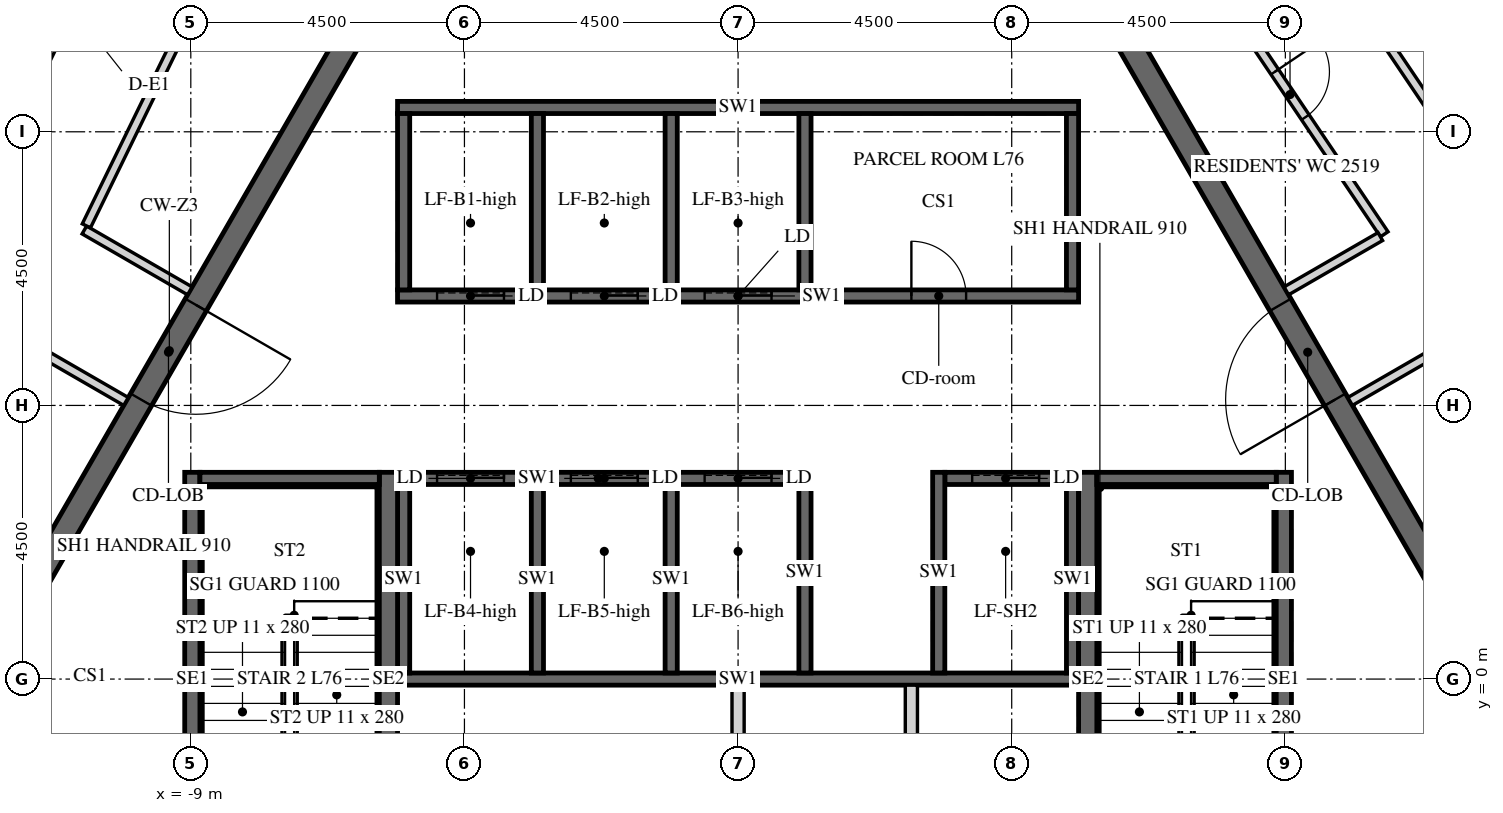
"""IFC4 building model, lengths in metres.
Left out: names, types, materials, properties, quantities, classifications, styles, units other than length and angle.
Written with IfcOpenShell. Run it as: python <this file> out.ifc"""

import sys

from ifc_helpers import new_model, si_unit, direction, frame, frame_2d, origin, place, context, subcontext, project, spatial, polyline, rectangle, outline, extrude, element, fill, save


model = new_model("IFC4")
c1 = context("Model", 3, precision=1e-05, world=origin(), true_north=direction((0.0, 1.0)))
c2 = subcontext(c1, "Body", "Model", "MODEL_VIEW")
j1 = project(units=[si_unit("LENGTHUNIT", "METRE"), si_unit("PLANEANGLEUNIT", "RADIAN")], contexts=[c1])
p1 = place(None, origin())
s1 = spatial("IfcSite", under=j1, at=p1, CompositionType="ELEMENT")
p2 = place(p1, origin())
s2 = spatial("IfcBuilding", under=s1, at=p2, CompositionType="ELEMENT")
p3 = place(p2, frame((0.0, 0.0, 314.7)))
s3 = spatial("IfcBuildingStorey", under=s2, at=p3, CompositionType="ELEMENT", Elevation=314.7)
p4 = place(p3, frame((-6.235, 10.8, -0.15), z_axis=(0.0, 0.0, 1.0), x_axis=(-0.499996419489, -0.866027470984, 0.0)))
e1 = element("IfcWall", 1, at=p4, inside=s3, PredefinedType="SHEAR", context=c2, shape_type="SweptSolid", body=[
    extrude(outline(polyline([(-0.115, -0.2), (12.586, -0.2), (12.355, 0.2), (0.115, 0.2), (-0.115, -0.2)])), origin(), (0.0, 0.0, 1.0), 3.9),
])
p5 = place(p4, frame((5.364, 0.0, 0.15)))
e2 = element("IfcOpeningElement", 2, at=p5, cuts=e1, PredefinedType="OPENING", context=c2, shape_type="SweptSolid", body=[
    extrude(rectangle(XDim=1.8, YDim=2.4, at=frame_2d((0.9, 1.2))), frame((0.0, 0.21, 0.0), z_axis=(0.0, -1.0, 0.0), x_axis=(1.0, 0.0, 0.0)), (0.0, 0.0, 1.0), 0.42),
])
p6 = place(p3, frame((-12.471, 0.0, -0.15), z_axis=(0.0, 0.0, 1.0), x_axis=(0.499996419489, -0.866027470984, 0.0)))
e3 = element("IfcWall", 3, at=p6, inside=s3, PredefinedType="SHEAR", context=c2, shape_type="SweptSolid", body=[
    extrude(outline(polyline([(-0.115, -0.2), (12.586, -0.2), (12.355, 0.2), (0.115, 0.2), (-0.115, -0.2)])), origin(), (0.0, 0.0, 1.0), 3.9),
])
p7 = place(p6, frame((5.306, 0.0, 0.15)))
e4 = element("IfcOpeningElement", 4, at=p7, cuts=e3, PredefinedType="OPENING", context=c2, shape_type="SweptSolid", body=[
    extrude(rectangle(XDim=1.8, YDim=2.4, at=frame_2d((0.9, 1.2))), frame((0.0, 0.21, 0.0), z_axis=(0.0, -1.0, 0.0), x_axis=(1.0, 0.0, 0.0)), (0.0, 0.0, 1.0), 0.42),
])
p8 = place(p3, frame((6.235, -10.8, -0.15), z_axis=(0.0, 0.0, 1.0), x_axis=(0.499996419489, 0.866027470984, 0.0)))
e5 = element("IfcWall", 5, at=p8, inside=s3, PredefinedType="SHEAR", context=c2, shape_type="SweptSolid", body=[
    extrude(outline(polyline([(-0.115, -0.2), (12.586, -0.2), (12.355, 0.2), (0.115, 0.2), (-0.115, -0.2)])), origin(), (0.0, 0.0, 1.0), 3.9),
])
p9 = place(p8, frame((5.364, 0.0, 0.15)))
e6 = element("IfcOpeningElement", 6, at=p9, cuts=e5, PredefinedType="OPENING", context=c2, shape_type="SweptSolid", body=[
    extrude(rectangle(XDim=1.8, YDim=2.4, at=frame_2d((0.9, 1.2))), frame((0.0, 0.21, 0.0), z_axis=(0.0, -1.0, 0.0), x_axis=(1.0, 0.0, 0.0)), (0.0, 0.0, 1.0), 0.42),
])
p10 = place(p3, frame((12.471, 0.0, -0.15), z_axis=(0.0, 0.0, 1.0), x_axis=(-0.499996419489, 0.866027470984, 0.0)))
e7 = element("IfcWall", 7, at=p10, inside=s3, PredefinedType="SHEAR", context=c2, shape_type="SweptSolid", body=[
    extrude(outline(polyline([(-0.115, -0.2), (12.586, -0.2), (12.355, 0.2), (0.115, 0.2), (-0.115, -0.2)])), origin(), (0.0, 0.0, 1.0), 3.9),
])
p11 = place(p10, frame((5.306, 0.0, 0.15)))
e8 = element("IfcOpeningElement", 8, at=p11, cuts=e7, PredefinedType="OPENING", context=c2, shape_type="SweptSolid", body=[
    extrude(rectangle(XDim=1.8, YDim=2.4, at=frame_2d((0.9, 1.2))), frame((0.0, 0.21, 0.0), z_axis=(0.0, -1.0, 0.0), x_axis=(1.0, 0.0, 0.0)), (0.0, 0.0, 1.0), 0.42),
])
p12 = place(p3, frame((-5.6, 6.3, -0.25), z_axis=(0.0, 0.0, 1.0), x_axis=(1.0, 0.0, 0.0)))
e9 = element("IfcWall", 9, at=p12, inside=s3, PredefinedType="SHEAR", context=c2, shape_type="SweptSolid", body=[
    extrude(rectangle(XDim=11.2, YDim=0.2, at=frame_2d((5.6, 0.0))), origin(), (0.0, 0.0, 1.0), 3.9),
])
p13 = place(p12, frame((8.45, 0.0, 0.25)))
e10 = element("IfcOpeningElement", 10, at=p13, cuts=e9, PredefinedType="OPENING", context=c2, shape_type="SweptSolid", body=[
    extrude(rectangle(XDim=0.9, YDim=2.1, at=frame_2d((0.45, 1.05))), frame((0.0, 0.11, 0.0), z_axis=(0.0, -1.0, 0.0), x_axis=(1.0, 0.0, 0.0)), (0.0, 0.0, 1.0), 0.22),
])
p14 = place(p12, frame((0.65, 0.0, 0.25)))
e11 = element("IfcOpeningElement", 11, at=p14, cuts=e9, PredefinedType="OPENING", context=c2, shape_type="SweptSolid", body=[
    extrude(rectangle(XDim=1.1, YDim=2.1, at=frame_2d((0.55, 1.05))), frame((0.0, 0.11, 0.0), z_axis=(0.0, -1.0, 0.0), x_axis=(1.0, 0.0, 0.0)), (0.0, 0.0, 1.0), 0.22),
])
p15 = place(p12, frame((2.85, 0.0, 0.25)))
e12 = element("IfcOpeningElement", 12, at=p15, cuts=e9, PredefinedType="OPENING", context=c2, shape_type="SweptSolid", body=[
    extrude(rectangle(XDim=1.1, YDim=2.1, at=frame_2d((0.55, 1.05))), frame((0.0, 0.11, 0.0), z_axis=(0.0, -1.0, 0.0), x_axis=(1.0, 0.0, 0.0)), (0.0, 0.0, 1.0), 0.22),
])
p16 = place(p12, frame((5.05, 0.0, 0.25)))
e13 = element("IfcOpeningElement", 13, at=p16, cuts=e9, PredefinedType="OPENING", context=c2, shape_type="SweptSolid", body=[
    extrude(rectangle(XDim=1.1, YDim=2.1, at=frame_2d((0.55, 1.05))), frame((0.0, 0.11, 0.0), z_axis=(0.0, -1.0, 0.0), x_axis=(1.0, 0.0, 0.0)), (0.0, 0.0, 1.0), 0.22),
])
p17 = place(p3, frame((-5.6, 9.4, -0.25), z_axis=(0.0, 0.0, 1.0), x_axis=(1.0, 0.0, 0.0)))
e14 = element("IfcWall", 14, at=p17, inside=s3, PredefinedType="SHEAR", context=c2, shape_type="SweptSolid", body=[
    extrude(rectangle(XDim=11.2, YDim=0.2, at=frame_2d((5.6, 0.0))), origin(), (0.0, 0.0, 1.0), 3.9),
])
for number, where, z_axis, x_axis in (
    (15, (-5.5, 6.4, -0.25), (0.0, 0.0, 1.0), (0.0, 1.0, 0.0)),
    (16, (-3.3, 6.4, -0.25), (0.0, 0.0, 1.0), (0.0, 1.0, 0.0)),
    (17, (-1.1, 6.4, -0.25), (0.0, 0.0, 1.0), (0.0, 1.0, 0.0)),
    (18, (1.1, 6.4, -0.25), (0.0, 0.0, 1.0), (0.0, 1.0, 0.0)),
    (19, (5.5, 6.4, -0.25), (0.0, 0.0, 1.0), (0.0, 1.0, 0.0)),
):
    element("IfcWall", number, at=place(p3, frame(where, z_axis=z_axis, x_axis=x_axis)), inside=s3, PredefinedType="SHEAR", context=c2, shape_type="SweptSolid", body=[
        extrude(rectangle(XDim=2.9, YDim=0.2, at=frame_2d((1.45, 0.0))), origin(), (0.0, 0.0, 1.0), 3.9),
    ])
p18 = place(p3, frame((-5.6, 3.3, -0.25), z_axis=(0.0, 0.0, 1.0), x_axis=(1.0, 0.0, 0.0)))
e20 = element("IfcWall", 20, at=p18, inside=s3, PredefinedType="SHEAR", context=c2, shape_type="SweptSolid", body=[
    extrude(rectangle(XDim=6.6, YDim=0.2, at=frame_2d((3.3, 0.0))), origin(), (0.0, 0.0, 1.0), 3.9),
])
p19 = place(p18, frame((0.65, 0.0, 0.25)))
e21 = element("IfcOpeningElement", 21, at=p19, cuts=e20, PredefinedType="OPENING", context=c2, shape_type="SweptSolid", body=[
    extrude(rectangle(XDim=1.1, YDim=2.1, at=frame_2d((0.55, 1.05))), frame((0.0, 0.11, 0.0), z_axis=(0.0, -1.0, 0.0), x_axis=(1.0, 0.0, 0.0)), (0.0, 0.0, 1.0), 0.22),
])
p20 = place(p18, frame((2.85, 0.0, 0.25)))
e22 = element("IfcOpeningElement", 22, at=p20, cuts=e20, PredefinedType="OPENING", context=c2, shape_type="SweptSolid", body=[
    extrude(rectangle(XDim=1.1, YDim=2.1, at=frame_2d((0.55, 1.05))), frame((0.0, 0.11, 0.0), z_axis=(0.0, -1.0, 0.0), x_axis=(1.0, 0.0, 0.0)), (0.0, 0.0, 1.0), 0.22),
])
p21 = place(p18, frame((5.05, 0.0, 0.25)))
e23 = element("IfcOpeningElement", 23, at=p21, cuts=e20, PredefinedType="OPENING", context=c2, shape_type="SweptSolid", body=[
    extrude(rectangle(XDim=1.1, YDim=2.1, at=frame_2d((0.55, 1.05))), frame((0.0, 0.11, 0.0), z_axis=(0.0, -1.0, 0.0), x_axis=(1.0, 0.0, 0.0)), (0.0, 0.0, 1.0), 0.22),
])
p22 = place(p3, frame((3.4, 3.3, -0.25), z_axis=(0.0, 0.0, 1.0), x_axis=(1.0, 0.0, 0.0)))
e24 = element("IfcWall", 24, at=p22, inside=s3, PredefinedType="SHEAR", context=c2, shape_type="SweptSolid", body=[
    extrude(rectangle(XDim=2.2, YDim=0.2, at=frame_2d((1.1, 0.0))), origin(), (0.0, 0.0, 1.0), 3.9),
])
p23 = place(p22, frame((0.45, 0.0, 0.25)))
e25 = element("IfcOpeningElement", 25, at=p23, cuts=e24, PredefinedType="OPENING", context=c2, shape_type="SweptSolid", body=[
    extrude(rectangle(XDim=1.1, YDim=2.1, at=frame_2d((0.55, 1.05))), frame((0.0, 0.11, 0.0), z_axis=(0.0, -1.0, 0.0), x_axis=(1.0, 0.0, 0.0)), (0.0, 0.0, 1.0), 0.22),
])
p24 = place(p3, frame((-5.6, 0.0, -0.25), z_axis=(0.0, 0.0, 1.0), x_axis=(1.0, 0.0, 0.0)))
e26 = element("IfcWall", 26, at=p24, inside=s3, PredefinedType="SHEAR", context=c2, shape_type="SweptSolid", body=[
    extrude(rectangle(XDim=11.2, YDim=0.2, at=frame_2d((5.6, 0.0))), origin(), (0.0, 0.0, 1.0), 3.9),
])
for number, where, z_axis, x_axis in (
    (27, (-5.5, 0.1, -0.25), (0.0, 0.0, 1.0), (0.0, 1.0, 0.0)),
    (28, (-3.3, 0.1, -0.25), (0.0, 0.0, 1.0), (0.0, 1.0, 0.0)),
    (29, (-1.1, 0.1, -0.25), (0.0, 0.0, 1.0), (0.0, 1.0, 0.0)),
):
    element("IfcWall", number, at=place(p3, frame(where, z_axis=z_axis, x_axis=x_axis)), inside=s3, PredefinedType="SHEAR", context=c2, shape_type="SweptSolid", body=[
        extrude(rectangle(XDim=3.1, YDim=0.2, at=frame_2d((1.55, 0.0))), origin(), (0.0, 0.0, 1.0), 3.9),
    ])
for number, where, z_axis, x_axis in (
    (30, (1.1, 0.1, -0.25), (0.0, 0.0, 1.0), (0.0, 1.0, 0.0)),
    (31, (3.3, 0.1, -0.25), (0.0, 0.0, 1.0), (0.0, 1.0, 0.0)),
):
    element("IfcWall", number, at=place(p3, frame(where, z_axis=z_axis, x_axis=x_axis)), inside=s3, PredefinedType="SHEAR", context=c2, shape_type="SweptSolid", body=[
        extrude(rectangle(XDim=3.3, YDim=0.2, at=frame_2d((1.65, 0.0))), origin(), (0.0, 0.0, 1.0), 3.9),
    ])
p25 = place(p3, frame((5.5, 0.1, -0.25), z_axis=(0.0, 0.0, 1.0), x_axis=(0.0, 1.0, 0.0)))
e32 = element("IfcWall", 32, at=p25, inside=s3, PredefinedType="SHEAR", context=c2, shape_type="SweptSolid", body=[
    extrude(rectangle(XDim=3.1, YDim=0.2, at=frame_2d((1.55, 0.0))), origin(), (0.0, 0.0, 1.0), 3.9),
])
p26 = place(p3, frame((2.85, -3.2, 0.0), z_axis=(0.0, 0.0, 1.0), x_axis=(0.0, 1.0, 0.0)))
e33 = element("IfcWall", 33, at=p26, inside=s3, PredefinedType="PARTITIONING", context=c2, shape_type="SweptSolid", body=[
    extrude(rectangle(XDim=3.1, YDim=0.2, at=frame_2d((1.55, 0.0))), origin(), (0.0, 0.0, 1.0), 3.65),
])
p27 = place(p3, frame((0.0, -6.2, 0.0), z_axis=(0.0, 0.0, 1.0), x_axis=(0.0, 1.0, 0.0)))
e34 = element("IfcWall", 34, at=p27, inside=s3, PredefinedType="PARTITIONING", context=c2, shape_type="SweptSolid", body=[
    extrude(rectangle(XDim=6.1, YDim=0.2, at=frame_2d((3.05, 0.0))), origin(), (0.0, 0.0, 1.0), 3.65),
])
p28 = place(p3, frame((5.75, -3.4, -0.25), z_axis=(0.0, 0.0, 1.0), x_axis=(0.0, 1.0, 0.0)))
e35 = element("IfcWall", 35, at=p28, inside=s3, PredefinedType="SHEAR", context=c2, shape_type="SweptSolid", body=[
    extrude(rectangle(XDim=6.8, YDim=0.3, at=frame_2d((3.4, 0.0))), origin(), (0.0, 0.0, 1.0), 3.9),
])
p29 = place(p3, frame((8.975, -3.4, -0.25), z_axis=(0.0, 0.0, 1.0), x_axis=(0.0, 1.0, 0.0)))
e36 = element("IfcWall", 36, at=p29, inside=s3, PredefinedType="SHEAR", context=c2, shape_type="SweptSolid", body=[
    extrude(rectangle(XDim=6.8, YDim=0.25, at=frame_2d((3.4, 0.0))), origin(), (0.0, 0.0, 1.0), 3.9),
])
p30 = place(p3, frame((5.9, 3.3, -0.25), z_axis=(0.0, 0.0, 1.0), x_axis=(1.0, 0.0, 0.0)))
e37 = element("IfcWall", 37, at=p30, inside=s3, PredefinedType="SHEAR", context=c2, shape_type="SweptSolid", body=[
    extrude(rectangle(XDim=2.95, YDim=0.2, at=frame_2d((1.475, 0.0))), origin(), (0.0, 0.0, 1.0), 3.9),
])
p31 = place(p3, frame((-5.75, -3.4, -0.25), z_axis=(0.0, 0.0, 1.0), x_axis=(0.0, 1.0, 0.0)))
e38 = element("IfcWall", 38, at=p31, inside=s3, PredefinedType="SHEAR", context=c2, shape_type="SweptSolid", body=[
    extrude(rectangle(XDim=6.8, YDim=0.3, at=frame_2d((3.4, 0.0))), origin(), (0.0, 0.0, 1.0), 3.9),
])
p32 = place(p3, frame((-8.975, -3.4, -0.25), z_axis=(0.0, 0.0, 1.0), x_axis=(0.0, 1.0, 0.0)))
e39 = element("IfcWall", 39, at=p32, inside=s3, PredefinedType="SHEAR", context=c2, shape_type="SweptSolid", body=[
    extrude(rectangle(XDim=6.8, YDim=0.25, at=frame_2d((3.4, 0.0))), origin(), (0.0, 0.0, 1.0), 3.9),
])
p33 = place(p3, frame((-8.85, 3.3, -0.25), z_axis=(0.0, 0.0, 1.0), x_axis=(1.0, 0.0, 0.0)))
e40 = element("IfcWall", 40, at=p33, inside=s3, PredefinedType="SHEAR", context=c2, shape_type="SweptSolid", body=[
    extrude(rectangle(XDim=2.95, YDim=0.2, at=frame_2d((1.475, 0.0))), origin(), (0.0, 0.0, 1.0), 3.9),
])
p34 = place(p3, frame((-8.247, 16.625, 0.0), z_axis=(0.0, 0.0, 1.0), x_axis=(-0.438381655451, -0.898788920806, 0.0)))
e41 = element("IfcWall", 41, at=p34, inside=s3, PredefinedType="PARTITIONING", context=c2, shape_type="SweptSolid", body=[
    extrude(rectangle(XDim=16.272, YDim=0.15, at=frame_2d((8.136, 0.0))), origin(), (0.0, 0.0, 1.0), 2.988),
])
p35 = place(p34, frame((5.703, 0.0, 0.0)))
e42 = element("IfcOpeningElement", 42, at=p35, cuts=e41, PredefinedType="OPENING", context=c2, shape_type="SweptSolid", body=[
    extrude(rectangle(XDim=1.0, YDim=2.1, at=frame_2d((0.5, 1.05))), frame((0.0, 0.085, 0.0), z_axis=(0.0, -1.0, 0.0), x_axis=(1.0, 0.0, 0.0)), (0.0, 0.0, 1.0), 0.17),
])
p36 = place(p3, frame((-9.016, 6.384, 0.0), z_axis=(0.0, 0.0, 1.0), x_axis=(-0.866029291668, 0.499993265928, 0.0)))
e43 = element("IfcWall", 43, at=p36, inside=s3, PredefinedType="PARTITIONING", context=c2, shape_type="SweptSolid", body=[
    extrude(rectangle(XDim=2.003, YDim=0.15, at=frame_2d((1.001, 0.0))), origin(), (0.0, 0.0, 1.0), 2.988),
])
p37 = place(p3, frame((-10.717, 7.453, 0.0), z_axis=(0.0, 0.0, 1.0), x_axis=(0.438363251035, 0.898797897273, 0.0)))
e44 = element("IfcWall", 44, at=p37, inside=s3, PredefinedType="PARTITIONING", context=c2, shape_type="SweptSolid", body=[
    extrude(rectangle(XDim=8.285, YDim=0.15, at=frame_2d((4.143, 0.0))), origin(), (0.0, 0.0, 1.0), 2.988),
])
p38 = place(p3, frame((-11.608, 5.456, 0.0), z_axis=(0.0, 0.0, 1.0), x_axis=(0.866032625367, -0.499987491644, 0.0)))
e45 = element("IfcWall", 45, at=p38, inside=s3, PredefinedType="PARTITIONING", context=c2, shape_type="SweptSolid", body=[
    extrude(rectangle(XDim=1.781, YDim=0.15, at=frame_2d((0.89, 0.0))), origin(), (0.0, 0.0, 1.0), 2.988),
])
p39 = place(p3, frame((18.521, -1.171, 0.0), z_axis=(0.0, 0.0, 1.0), x_axis=(-0.559193232449, 0.829037350656, 0.0)))
e46 = element("IfcWall", 46, at=p39, inside=s3, PredefinedType="PARTITIONING", context=c2, shape_type="SweptSolid", body=[
    extrude(rectangle(XDim=16.272, YDim=0.15, at=frame_2d((8.136, 0.0))), origin(), (0.0, 0.0, 1.0), 2.988),
])
p40 = place(p39, frame((3.703, 0.0, 0.0)))
e47 = element("IfcOpeningElement", 47, at=p40, cuts=e46, PredefinedType="OPENING", context=c2, shape_type="SweptSolid", body=[
    extrude(rectangle(XDim=1.0, YDim=2.1, at=frame_2d((0.5, 1.05))), frame((0.0, 0.085, 0.0), z_axis=(0.0, -1.0, 0.0), x_axis=(1.0, 0.0, 0.0)), (0.0, 0.0, 1.0), 0.17),
])
p41 = place(p3, frame((10.066, 4.566, 0.0), z_axis=(0.0, 0.0, 1.0), x_axis=(0.866033651025, 0.499985715088, 0.0)))
e48 = element("IfcWall", 48, at=p41, inside=s3, PredefinedType="PARTITIONING", context=c2, shape_type="SweptSolid", body=[
    extrude(rectangle(XDim=2.007, YDim=0.15, at=frame_2d((1.003, 0.0))), origin(), (0.0, 0.0, 1.0), 2.988),
])
p42 = place(p3, frame((7.527, 11.91, 0.0), z_axis=(0.0, 0.0, 1.0), x_axis=(0.5592050336, -0.82902939055, 0.0)))
e49 = element("IfcWall", 49, at=p42, inside=s3, PredefinedType="PARTITIONING", context=c2, shape_type="SweptSolid", body=[
    extrude(rectangle(XDim=5.543, YDim=0.15, at=frame_2d((2.771, 0.0))), origin(), (0.0, 0.0, 1.0), 2.988),
])
p43 = place(p42, frame((2.322, 0.0, 0.0)))
e50 = element("IfcOpeningElement", 50, at=p43, cuts=e49, PredefinedType="OPENING", context=c2, shape_type="SweptSolid", body=[
    extrude(rectangle(XDim=0.9, YDim=2.1, at=frame_2d((0.45, 1.05))), frame((0.0, 0.085, 0.0), z_axis=(0.0, -1.0, 0.0), x_axis=(1.0, 0.0, 0.0)), (0.0, 0.0, 1.0), 0.17),
])
p44 = place(p3, frame((10.562, 7.277, 0.0), z_axis=(0.0, 0.0, 1.0), x_axis=(-0.86601248742, -0.500022371132, 0.0)))
e51 = element("IfcWall", 51, at=p44, inside=s3, PredefinedType="PARTITIONING", context=c2, shape_type="SweptSolid", body=[
    extrude(rectangle(XDim=1.785, YDim=0.15, at=frame_2d((0.893, 0.0))), origin(), (0.0, 0.0, 1.0), 2.988),
])
p45 = place(p5, origin())
e52 = element("IfcDoor", 52, at=p45, inside=s3, OperationType="DOUBLE_DOOR_SINGLE_SWING", PredefinedType="DOOR", context=c2, shape_type="SweptSolid", body=[
    extrude(rectangle(XDim=1.8, YDim=2.4, at=frame_2d((0.9, 1.2))), frame((0.0, 0.025, 0.0), z_axis=(0.0, -1.0, 0.0), x_axis=(1.0, 0.0, 0.0)), (0.0, 0.0, 1.0), 0.05),
])
fill(e2, e52)
p46 = place(p11, origin())
e53 = element("IfcDoor", 53, at=p46, inside=s3, OperationType="DOUBLE_DOOR_SINGLE_SWING", PredefinedType="DOOR", context=c2, shape_type="SweptSolid", body=[
    extrude(rectangle(XDim=1.8, YDim=2.4, at=frame_2d((0.9, 1.2))), frame((0.0, 0.025, 0.0), z_axis=(0.0, -1.0, 0.0), x_axis=(1.0, 0.0, 0.0)), (0.0, 0.0, 1.0), 0.05),
])
fill(e8, e53)
p47 = place(p13, origin())
e54 = element("IfcDoor", 54, at=p47, inside=s3, OperationType="SINGLE_SWING_LEFT", PredefinedType="DOOR", context=c2, shape_type="SweptSolid", body=[
    extrude(rectangle(XDim=0.9, YDim=2.1, at=frame_2d((0.45, 1.05))), frame((0.0, 0.025, 0.0), z_axis=(0.0, -1.0, 0.0), x_axis=(1.0, 0.0, 0.0)), (0.0, 0.0, 1.0), 0.05),
])
fill(e10, e54)
p48 = place(p14, origin())
e55 = element("IfcDoor", 55, at=p48, inside=s3, OperationType="SLIDING_TO_LEFT", PredefinedType="DOOR", context=c2, shape_type="SweptSolid", body=[
    extrude(rectangle(XDim=1.1, YDim=2.1, at=frame_2d((0.55, 1.05))), frame((0.0, 0.025, 0.0), z_axis=(0.0, -1.0, 0.0), x_axis=(1.0, 0.0, 0.0)), (0.0, 0.0, 1.0), 0.05),
])
fill(e11, e55)
p49 = place(p15, origin())
e56 = element("IfcDoor", 56, at=p49, inside=s3, OperationType="SLIDING_TO_LEFT", PredefinedType="DOOR", context=c2, shape_type="SweptSolid", body=[
    extrude(rectangle(XDim=1.1, YDim=2.1, at=frame_2d((0.55, 1.05))), frame((0.0, 0.025, 0.0), z_axis=(0.0, -1.0, 0.0), x_axis=(1.0, 0.0, 0.0)), (0.0, 0.0, 1.0), 0.05),
])
fill(e12, e56)
p50 = place(p16, origin())
e57 = element("IfcDoor", 57, at=p50, inside=s3, OperationType="SLIDING_TO_LEFT", PredefinedType="DOOR", context=c2, shape_type="SweptSolid", body=[
    extrude(rectangle(XDim=1.1, YDim=2.1, at=frame_2d((0.55, 1.05))), frame((0.0, 0.025, 0.0), z_axis=(0.0, -1.0, 0.0), x_axis=(1.0, 0.0, 0.0)), (0.0, 0.0, 1.0), 0.05),
])
fill(e13, e57)
p51 = place(p19, origin())
e58 = element("IfcDoor", 58, at=p51, inside=s3, OperationType="SLIDING_TO_LEFT", PredefinedType="DOOR", context=c2, shape_type="SweptSolid", body=[
    extrude(rectangle(XDim=1.1, YDim=2.1, at=frame_2d((0.55, 1.05))), frame((0.0, 0.025, 0.0), z_axis=(0.0, -1.0, 0.0), x_axis=(1.0, 0.0, 0.0)), (0.0, 0.0, 1.0), 0.05),
])
fill(e21, e58)
p52 = place(p20, origin())
e59 = element("IfcDoor", 59, at=p52, inside=s3, OperationType="SLIDING_TO_LEFT", PredefinedType="DOOR", context=c2, shape_type="SweptSolid", body=[
    extrude(rectangle(XDim=1.1, YDim=2.1, at=frame_2d((0.55, 1.05))), frame((0.0, 0.025, 0.0), z_axis=(0.0, -1.0, 0.0), x_axis=(1.0, 0.0, 0.0)), (0.0, 0.0, 1.0), 0.05),
])
fill(e22, e59)
p53 = place(p21, origin())
e60 = element("IfcDoor", 60, at=p53, inside=s3, OperationType="SLIDING_TO_LEFT", PredefinedType="DOOR", context=c2, shape_type="SweptSolid", body=[
    extrude(rectangle(XDim=1.1, YDim=2.1, at=frame_2d((0.55, 1.05))), frame((0.0, 0.025, 0.0), z_axis=(0.0, -1.0, 0.0), x_axis=(1.0, 0.0, 0.0)), (0.0, 0.0, 1.0), 0.05),
])
fill(e23, e60)
p54 = place(p23, origin())
e61 = element("IfcDoor", 61, at=p54, inside=s3, OperationType="SLIDING_TO_LEFT", PredefinedType="DOOR", context=c2, shape_type="SweptSolid", body=[
    extrude(rectangle(XDim=1.1, YDim=2.1, at=frame_2d((0.55, 1.05))), frame((0.0, 0.025, 0.0), z_axis=(0.0, -1.0, 0.0), x_axis=(1.0, 0.0, 0.0)), (0.0, 0.0, 1.0), 0.05),
])
fill(e25, e61)
p55 = place(p43, origin())
e62 = element("IfcDoor", 62, at=p55, inside=s3, OperationType="SINGLE_SWING_RIGHT", PredefinedType="DOOR", context=c2, shape_type="SweptSolid", body=[
    extrude(rectangle(XDim=0.9, YDim=2.1, at=frame_2d((0.45, 1.05))), frame((0.0, 0.025, 0.0), z_axis=(0.0, -1.0, 0.0), x_axis=(1.0, 0.0, 0.0)), (0.0, 0.0, 1.0), 0.05),
])
fill(e50, e62)
save(model, sys.argv[1])
